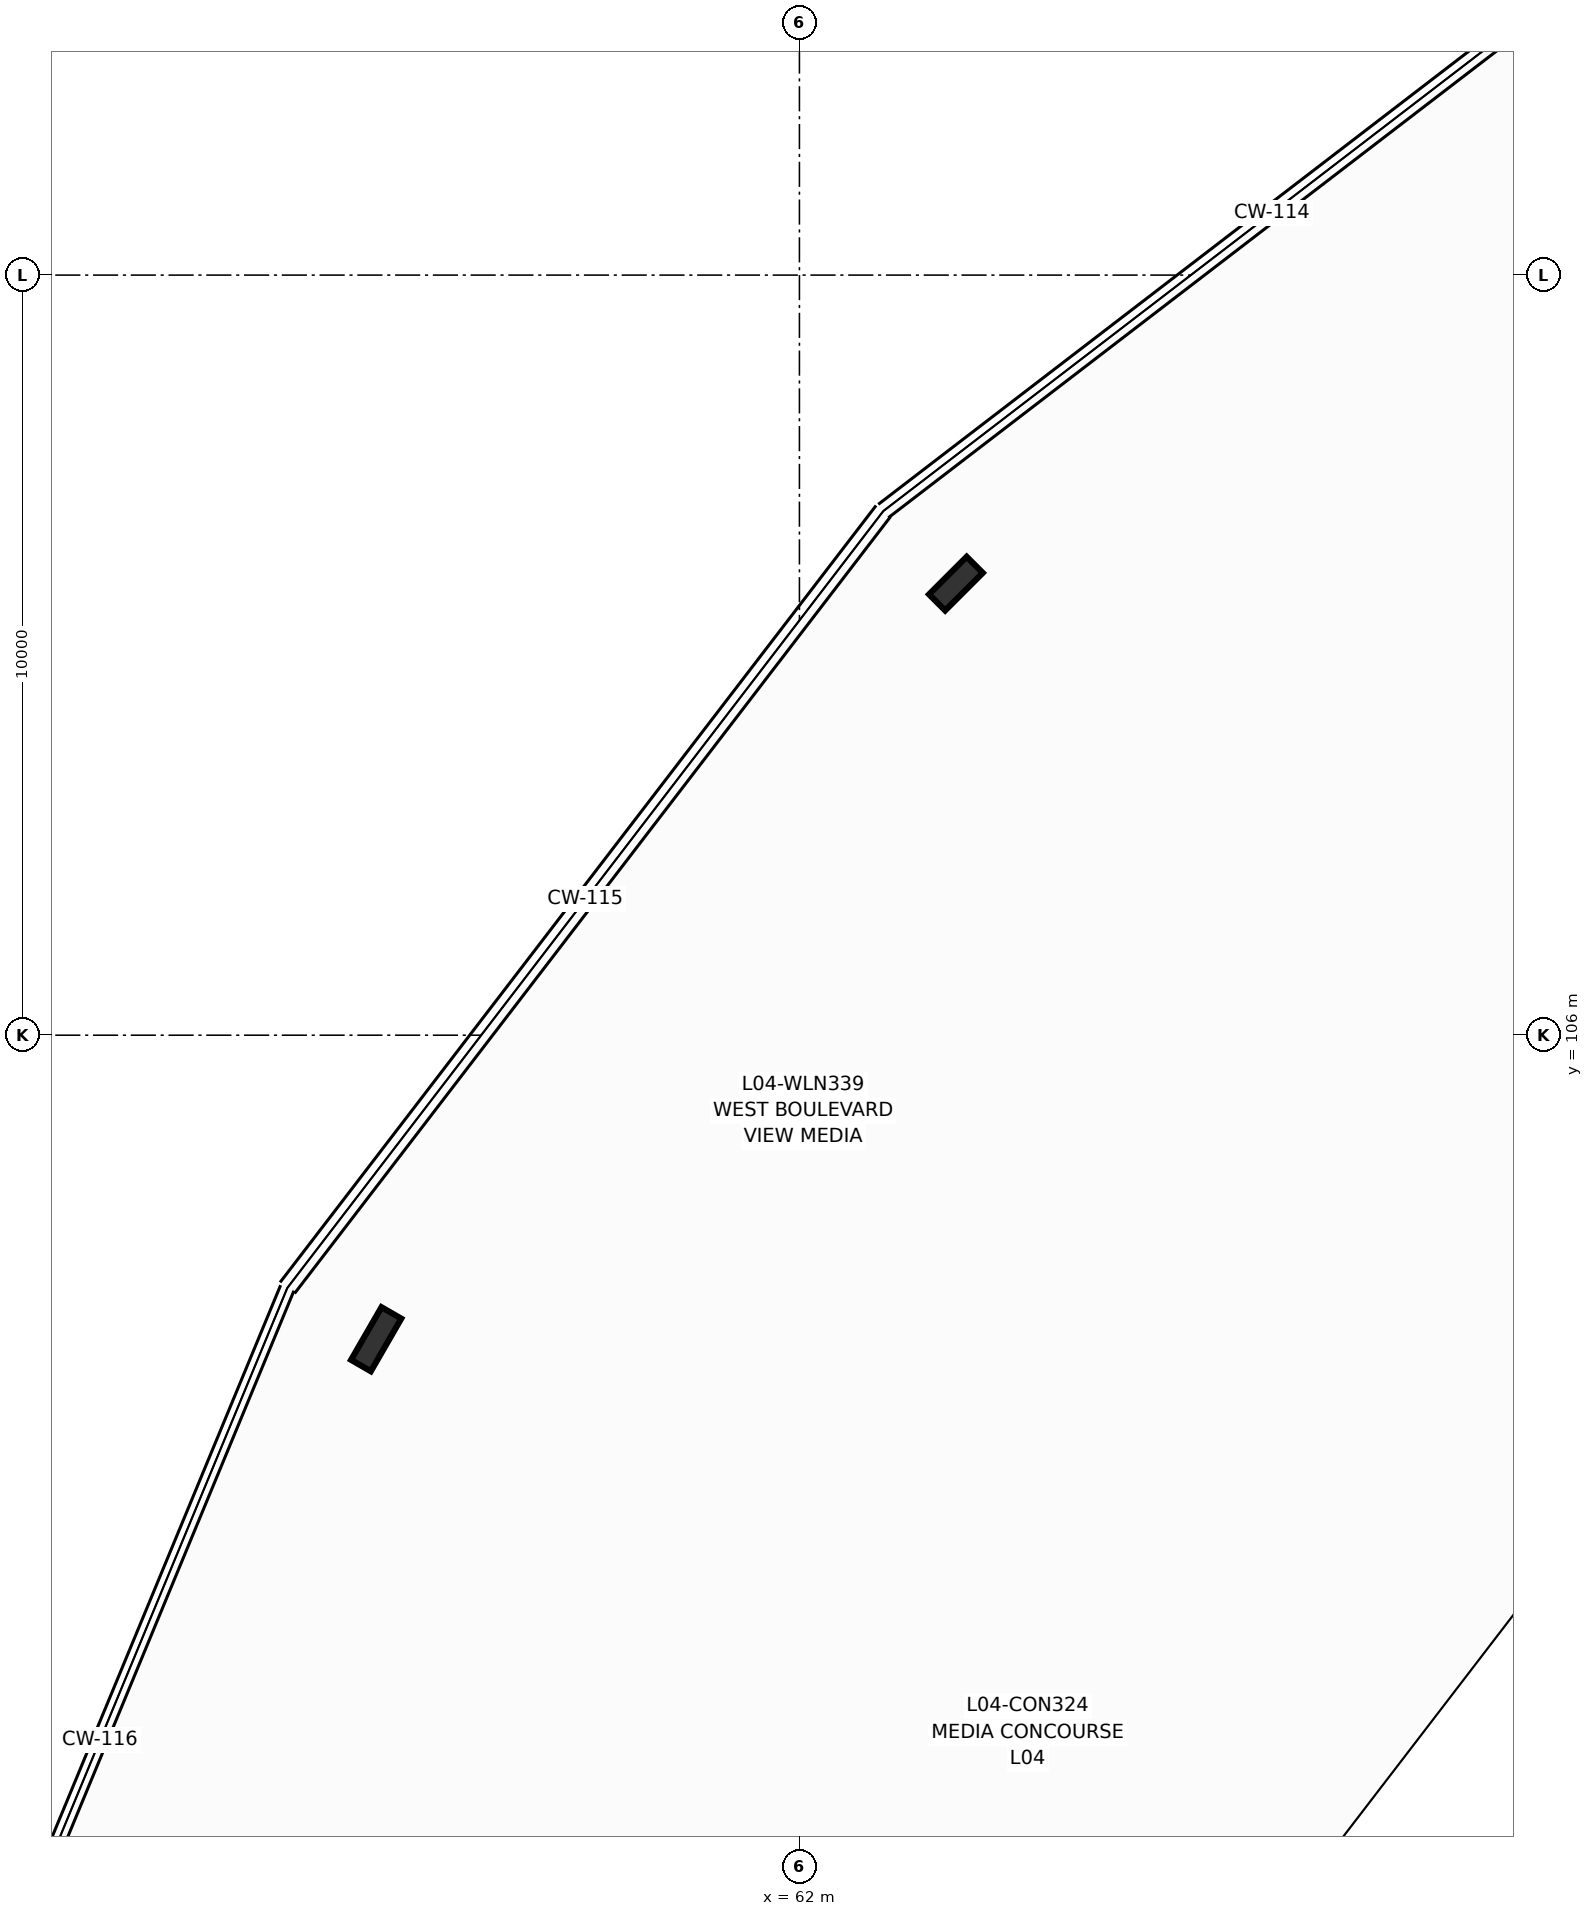
"""IFC4 building model, lengths in metres.
Left out: names, types, materials, properties, quantities, classifications, styles, units other than length and angle.
Written with IfcOpenShell. Run it as: python <this file> out.ifc"""

import sys

from ifc_helpers import new_model, si_unit, direction, frame, frame_2d, origin, origin_2d, place, context, subcontext, project, spatial, rectangle, i_section, extrude, element, save


model = new_model("IFC4")
c1 = context("Model", 3, precision=1e-05, world=origin(), true_north=direction((0.0, 1.0)))
c2 = subcontext(c1, "Body", "Model", "MODEL_VIEW")
j1 = project(units=[si_unit("LENGTHUNIT", "METRE"), si_unit("PLANEANGLEUNIT", "RADIAN")], contexts=[c1])
p1 = place(None, origin())
s1 = spatial("IfcSite", under=j1, at=p1, CompositionType="ELEMENT")
p2 = place(p1, origin())
s2 = spatial("IfcBuilding", under=s1, at=p2, CompositionType="ELEMENT")
p3 = place(p2, frame((0.0, 0.0, 18.0)))
s3 = spatial("IfcBuildingStorey", under=s2, at=p3, CompositionType="ELEMENT", Elevation=18.0)
p4 = place(p3, frame((64.059, 111.941, 0.0), z_axis=(0.0, 0.0, 1.0), x_axis=(-0.707106781187, 0.707106781187, 0.0)))
e1 = element("IfcColumn", 1, at=p4, inside=s3, PredefinedType="COLUMN", context=c2, shape_type="SweptSolid", body=[
    extrude(i_section(OverallWidth=0.3, OverallDepth=0.7, WebThickness=0.017, FlangeThickness=0.032, at=origin_2d()), origin(), (0.0, 0.0, 1.0), 4.5),
])
p5 = place(p3, frame((56.431, 102.0, 0.0), z_axis=(0.0, 0.0, 1.0), x_axis=(-0.866025403784, 0.5, 0.0)))
e2 = element("IfcColumn", 2, at=p5, inside=s3, PredefinedType="COLUMN", context=c2, shape_type="SweptSolid", body=[
    extrude(i_section(OverallWidth=0.3, OverallDepth=0.8, WebThickness=0.018, FlangeThickness=0.033, at=origin_2d()), origin(), (0.0, 0.0, 1.0), 4.5),
])
p6 = place(p3, frame((75.812, 99.571, 0.0), z_axis=(0.0, 0.0, 1.0), x_axis=(-0.608807390719, -0.793318070515, 0.0)))
e3 = element("IfcWall", 3, at=p6, inside=s3, PredefinedType="SOLIDWALL", context=c2, shape_type="SweptSolid", body=[
    extrude(rectangle(XDim=7.213, YDim=0.37, at=frame_2d((3.606, 0.0))), origin(), (0.0, 0.0, 1.0), 4.5),
])
save(model, sys.argv[1])
